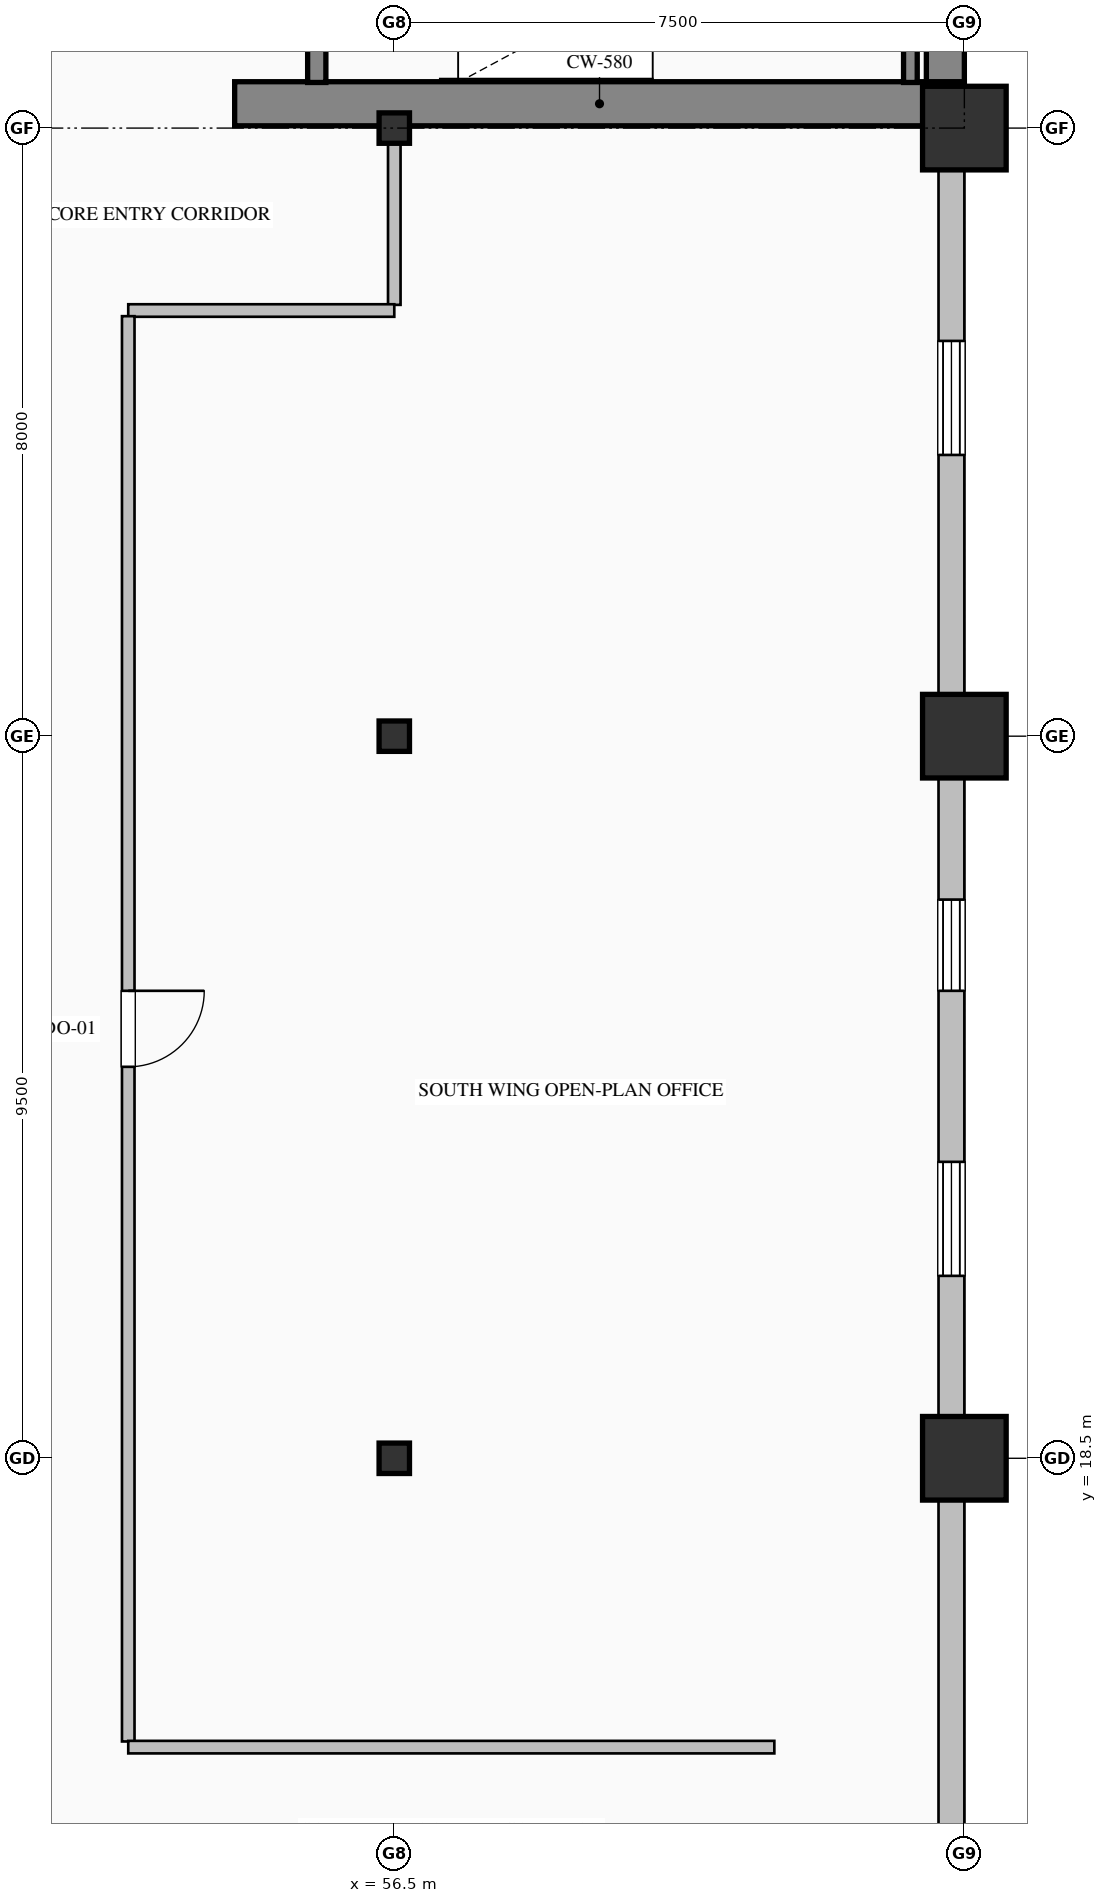
"""IFC4 building model, lengths in metres.
Left out: names, types, materials, properties, quantities, classifications, styles, units other than length and angle.
Written with IfcOpenShell. Run it as: python <this file> out.ifc"""

import sys

from ifc_helpers import new_model, si_unit, direction, frame, frame_2d, origin, origin_2d, place, context, subcontext, project, spatial, rectangle, hollow_rectangle, i_section, extrude, element, fill, save


model = new_model("IFC4")
c1 = context("Model", 3, precision=1e-05, world=origin(), true_north=direction((0.0, 1.0)))
c2 = subcontext(c1, "Body", "Model", "MODEL_VIEW")
j1 = project(units=[si_unit("LENGTHUNIT", "METRE"), si_unit("PLANEANGLEUNIT", "RADIAN")], contexts=[c1])
p1 = place(None, origin())
s1 = spatial("IfcSite", under=j1, at=p1, CompositionType="ELEMENT")
p2 = place(p1, origin())
s2 = spatial("IfcBuilding", under=s1, at=p2, CompositionType="ELEMENT")
p3 = place(p2, frame((0.0, 0.0, 139.0)))
s3 = spatial("IfcBuildingStorey", under=s2, at=p3, CompositionType="ELEMENT", Elevation=139.0)
p4 = place(p3, frame((63.75, 36.32, 0.0), z_axis=(0.0, 0.0, 1.0), x_axis=(0.0, 1.0, 0.0)))
e1 = element("IfcWall", 1, at=p4, inside=s3, PredefinedType="SHEAR", context=c2, shape_type="SweptSolid", body=[
    extrude(rectangle(XDim=15.18, YDim=0.5, at=frame_2d((7.59, 0.0))), origin(), (0.0, 0.0, 1.0), 3.765),
])
p5 = place(p3, frame((54.4, 36.32, 0.0), z_axis=(0.0, 0.0, 1.0), x_axis=(1.0, 0.0, 0.0)))
e2 = element("IfcWall", 2, at=p5, inside=s3, PredefinedType="SHEAR", context=c2, shape_type="SweptSolid", body=[
    extrude(rectangle(XDim=9.6, YDim=0.58, at=frame_2d((4.8, 0.0))), origin(), (0.0, 0.0, 1.0), 4.0),
])
for number, where, z_axis, x_axis in (
    (3, (56.5, 18.5, 0.0), (0.0, 0.0, 1.0), (1.0, 0.0, 0.0)),
    (4, (56.5, 28.0, 0.0), (0.0, 0.0, 1.0), (1.0, 0.0, 0.0)),
    (5, (56.5, 36.0, 0.0), (0.0, 0.0, 1.0), (1.0, 0.0, 0.0)),
):
    element("IfcColumn", number, at=place(p3, frame(where, z_axis=z_axis, x_axis=x_axis)), inside=s3, PredefinedType="COLUMN", context=c2, shape_type="SweptSolid", body=[
        extrude(i_section(OverallWidth=0.4, OverallDepth=0.4, WebThickness=0.013, FlangeThickness=0.021, FilletRadius=0.022, at=origin_2d()), origin(), (0.0, 0.0, 1.0), 4.0),
    ])
for number, where, z_axis, x_axis in (
    (6, (64.0, 18.5, 0.0), (0.0, 0.0, 1.0), (1.0, 0.0, 0.0)),
    (7, (64.0, 28.0, 0.0), (0.0, 0.0, 1.0), (1.0, 0.0, 0.0)),
    (8, (64.0, 36.0, 0.0), (0.0, 0.0, 1.0), (1.0, 0.0, 0.0)),
):
    element("IfcColumn", number, at=place(p3, frame(where, z_axis=z_axis, x_axis=x_axis)), inside=s3, PredefinedType="COLUMN", context=c2, shape_type="SweptSolid", body=[
        extrude(hollow_rectangle(XDim=1.1, YDim=1.1, WallThickness=0.04, at=origin_2d()), origin(), (0.0, 0.0, 1.0), 4.0),
    ])
p6 = place(p3, frame((63.83, 36.05, 0.0), z_axis=(0.0, 0.0, 1.0), x_axis=(0.0, -1.0, 0.0)))
e9 = element("IfcWall", 9, at=p6, inside=s3, PredefinedType="SOLIDWALL", context=c2, shape_type="SweptSolid", body=[
    extrude(rectangle(XDim=28.05, YDim=0.34, at=frame_2d((14.025, 0.0))), origin(), (0.0, 0.0, 1.0), 3.265),
])
p7 = place(p6, frame((2.85, 0.0, 0.85)))
e10 = element("IfcOpeningElement", 10, at=p7, cuts=e9, PredefinedType="OPENING", context=c2, shape_type="SweptSolid", body=[
    extrude(rectangle(XDim=1.5, YDim=1.95, at=frame_2d((0.75, 0.975))), frame((0.0, 0.18, 0.0), z_axis=(0.0, -1.0, 0.0), x_axis=(1.0, 0.0, 0.0)), (0.0, 0.0, 1.0), 0.36),
])
p8 = place(p6, frame((10.2, 0.0, 0.7)))
e11 = element("IfcOpeningElement", 11, at=p8, cuts=e9, PredefinedType="OPENING", context=c2, shape_type="SweptSolid", body=[
    extrude(rectangle(XDim=1.2, YDim=1.85, at=frame_2d((0.6, 0.925))), frame((0.0, 0.18, 0.0), z_axis=(0.0, -1.0, 0.0), x_axis=(1.0, 0.0, 0.0)), (0.0, 0.0, 1.0), 0.36),
])
p9 = place(p6, frame((13.65, 0.0, 0.85)))
e12 = element("IfcOpeningElement", 12, at=p9, cuts=e9, PredefinedType="OPENING", context=c2, shape_type="SweptSolid", body=[
    extrude(rectangle(XDim=1.5, YDim=1.95, at=frame_2d((0.75, 0.975))), frame((0.0, 0.18, 0.0), z_axis=(0.0, -1.0, 0.0), x_axis=(1.0, 0.0, 0.0)), (0.0, 0.0, 1.0), 0.36),
])
p10 = place(p6, frame((24.45, 0.0, 0.85)))
e13 = element("IfcOpeningElement", 13, at=p10, cuts=e9, PredefinedType="OPENING", context=c2, shape_type="SweptSolid", body=[
    extrude(rectangle(XDim=1.5, YDim=1.95, at=frame_2d((0.75, 0.975))), frame((0.0, 0.18, 0.0), z_axis=(0.0, -1.0, 0.0), x_axis=(1.0, 0.0, 0.0)), (0.0, 0.0, 1.0), 0.36),
])
p11 = place(p3, frame((55.48, 39.75, 0.0), z_axis=(0.0, 0.0, 1.0), x_axis=(0.0, -1.0, 0.0)))
e14 = element("IfcWall", 14, at=p11, inside=s3, PredefinedType="SOLIDWALL", context=c2, shape_type="SweptSolid", body=[
    extrude(rectangle(XDim=3.15, YDim=0.24, at=frame_2d((1.575, 0.0))), origin(), (0.0, 0.0, 1.0), 4.0),
])
p12 = place(p11, frame((1.0, 0.0, 0.0)))
e15 = element("IfcOpeningElement", 15, at=p12, cuts=e14, PredefinedType="OPENING", context=c2, shape_type="SweptSolid", body=[
    extrude(rectangle(XDim=1.15, YDim=2.2, at=frame_2d((0.575, 1.1))), frame((0.0, 0.13, 0.0), z_axis=(0.0, -1.0, 0.0), x_axis=(1.0, 0.0, 0.0)), (0.0, 0.0, 1.0), 0.26),
])
p13 = place(p3, frame((63.29, 36.6, 0.0), z_axis=(0.0, 0.0, 1.0), x_axis=(0.0, 1.0, 0.0)))
e16 = element("IfcWall", 16, at=p13, inside=s3, PredefinedType="SOLIDWALL", context=c2, shape_type="SweptSolid", body=[
    extrude(rectangle(XDim=3.15, YDim=0.18, at=frame_2d((1.575, 0.0))), origin(), (0.0, 0.0, 1.0), 4.0),
])
p14 = place(p3, frame((56.5, 36.0, 0.0), z_axis=(0.0, 0.0, 1.0), x_axis=(0.0, -1.0, 0.0)))
e17 = element("IfcWall", 17, at=p14, inside=s3, PredefinedType="PARTITIONING", context=c2, shape_type="SweptSolid", body=[
    extrude(rectangle(XDim=2.325, YDim=0.165, at=frame_2d((1.163, 0.0))), origin(), (0.0, 0.0, 1.0), 3.157),
])
p15 = place(p3, frame((56.5, 33.6, 0.0), z_axis=(0.0, 0.0, 1.0), x_axis=(-1.0, 0.0, 0.0)))
e18 = element("IfcWall", 18, at=p15, inside=s3, PredefinedType="PARTITIONING", context=c2, shape_type="SweptSolid", body=[
    extrude(rectangle(XDim=3.5, YDim=0.165, at=frame_2d((1.75, 0.0))), origin(), (0.0, 0.0, 1.0), 3.765),
])
p16 = place(p3, frame((53.0, 33.525, 0.0), z_axis=(0.0, 0.0, 1.0), x_axis=(0.0, -1.0, 0.0)))
e19 = element("IfcWall", 19, at=p16, inside=s3, PredefinedType="PARTITIONING", context=c2, shape_type="SweptSolid", body=[
    extrude(rectangle(XDim=18.751, YDim=0.165, at=frame_2d((9.375, 0.0))), origin(), (0.0, 0.0, 1.0), 3.765),
])
p17 = place(p16, frame((8.875, 0.0, 0.0)))
e20 = element("IfcOpeningElement", 20, at=p17, cuts=e19, PredefinedType="OPENING", context=c2, shape_type="SweptSolid", body=[
    extrude(rectangle(XDim=1.0, YDim=2.15, at=frame_2d((0.5, 1.075))), frame((0.0, 0.093, 0.0), z_axis=(0.0, -1.0, 0.0), x_axis=(1.0, 0.0, 0.0)), (0.0, 0.0, 1.0), 0.185),
])
p18 = place(p3, frame((53.0, 14.7, 0.0), z_axis=(0.0, 0.0, 1.0), x_axis=(1.0, 0.0, 0.0)))
e21 = element("IfcWall", 21, at=p18, inside=s3, PredefinedType="PARTITIONING", context=c2, shape_type="SweptSolid", body=[
    extrude(rectangle(XDim=8.5, YDim=0.165, at=frame_2d((4.25, 0.0))), origin(), (0.0, 0.0, 1.0), 3.765),
])
p19 = place(p7, origin())
e22 = element("IfcWindow", 22, at=p19, inside=s3, PartitioningType="DOUBLE_PANEL_VERTICAL", PredefinedType="WINDOW", context=c2, shape_type="SweptSolid", body=[
    extrude(rectangle(XDim=1.5, YDim=1.95, at=frame_2d((0.75, 0.975))), frame((0.0, 0.15, 0.0), z_axis=(0.0, -1.0, 0.0), x_axis=(1.0, 0.0, 0.0)), (0.0, 0.0, 1.0), 0.06),
])
fill(e10, e22)
p20 = place(p8, origin())
e23 = element("IfcWindow", 23, at=p20, inside=s3, PartitioningType="DOUBLE_PANEL_VERTICAL", PredefinedType="WINDOW", context=c2, shape_type="SweptSolid", body=[
    extrude(rectangle(XDim=1.2, YDim=1.85, at=frame_2d((0.6, 0.925))), frame((0.0, 0.15, 0.0), z_axis=(0.0, -1.0, 0.0), x_axis=(1.0, 0.0, 0.0)), (0.0, 0.0, 1.0), 0.06),
])
fill(e11, e23)
p21 = place(p9, origin())
e24 = element("IfcWindow", 24, at=p21, inside=s3, PartitioningType="DOUBLE_PANEL_VERTICAL", PredefinedType="WINDOW", context=c2, shape_type="SweptSolid", body=[
    extrude(rectangle(XDim=1.5, YDim=1.95, at=frame_2d((0.75, 0.975))), frame((0.0, 0.15, 0.0), z_axis=(0.0, -1.0, 0.0), x_axis=(1.0, 0.0, 0.0)), (0.0, 0.0, 1.0), 0.06),
])
fill(e12, e24)
p22 = place(p17, origin())
e25 = element("IfcDoor", 25, at=p22, inside=s3, OperationType="SINGLE_SWING_LEFT", PredefinedType="DOOR", context=c2, shape_type="SweptSolid", body=[
    extrude(rectangle(XDim=1.0, YDim=2.15, at=frame_2d((0.5, 1.075))), frame((0.0, 0.025, 0.0), z_axis=(0.0, -1.0, 0.0), x_axis=(1.0, 0.0, 0.0)), (0.0, 0.0, 1.0), 0.05),
])
fill(e20, e25)
save(model, sys.argv[1])
